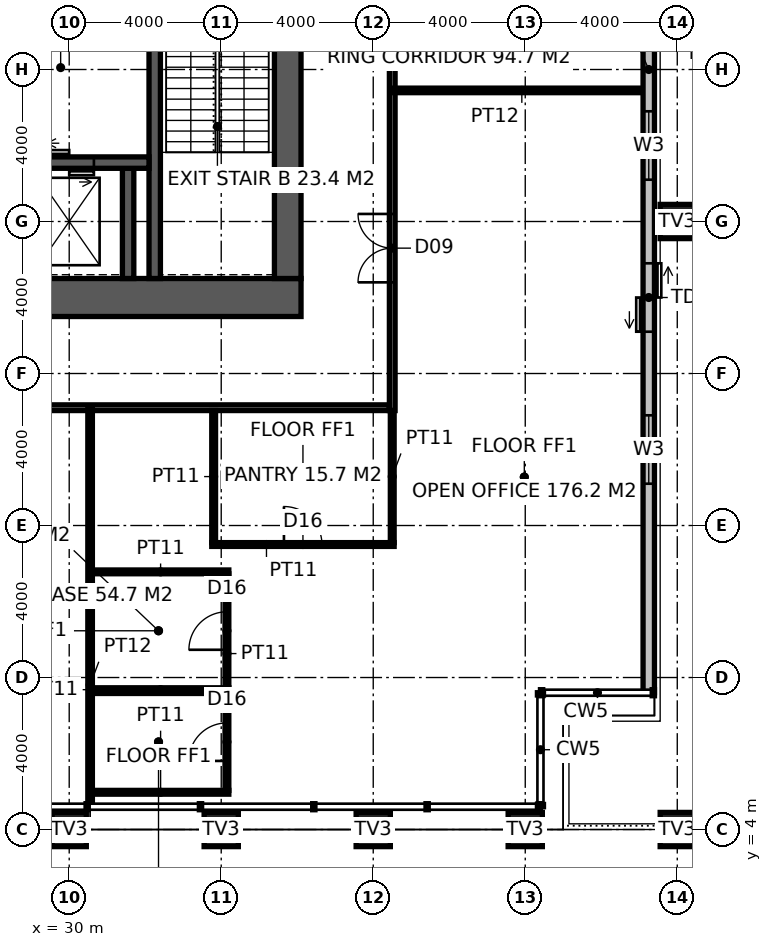
"""IFC4 building model, lengths in metres.
Left out: names, types, materials, properties, quantities, classifications, styles, units other than length and angle.
Written with IfcOpenShell. Run it as: python <this file> out.ifc"""

import sys

from ifc_helpers import new_model, si_unit, direction, frame, frame_2d, origin, origin_2d, place, context, subcontext, project, spatial, rectangle, hollow_rectangle, extrude, element, fill, save


model = new_model("IFC4")
c1 = context("Model", 3, precision=1e-05, world=origin(), true_north=direction((0.0, 1.0)))
c2 = subcontext(c1, "Body", "Model", "MODEL_VIEW")
j1 = project(units=[si_unit("LENGTHUNIT", "METRE"), si_unit("PLANEANGLEUNIT", "RADIAN")], contexts=[c1])
p1 = place(None, origin())
s1 = spatial("IfcSite", under=j1, at=p1, CompositionType="ELEMENT")
p2 = place(p1, origin())
s2 = spatial("IfcBuilding", under=s1, at=p2, CompositionType="ELEMENT")
p3 = place(p2, frame((0.0, 0.0, 270.2)))
s3 = spatial("IfcBuildingStorey", under=s2, at=p3, CompositionType="ELEMENT", Elevation=270.2)
for number, where, z_axis, x_axis in (
    (1, (30.0, 4.0, 0.0), (0.0, 0.0, 1.0), (1.0, 0.0, 0.0)),
    (2, (34.0, 4.0, 0.0), (0.0, 0.0, 1.0), (1.0, 0.0, 0.0)),
    (3, (38.0, 4.0, 0.0), (0.0, 0.0, 1.0), (1.0, 0.0, 0.0)),
    (4, (42.0, 4.0, 0.0), (0.0, 0.0, 1.0), (1.0, 0.0, 0.0)),
    (5, (46.0, 4.0, 0.0), (0.0, 0.0, 1.0), (1.0, 0.0, 0.0)),
    (6, (46.0, 20.0, 0.0), (0.0, 0.0, 1.0), (1.0, 0.0, 0.0)),
):
    element("IfcColumn", number, at=place(p3, frame(where, z_axis=z_axis, x_axis=x_axis)), inside=s3, PredefinedType="USERDEFINED", context=c2, shape_type="SweptSolid", body=[
        extrude(hollow_rectangle(XDim=0.9, YDim=0.9, WallThickness=0.08, at=origin_2d()), origin(), (0.0, 0.0, 1.0), 4.0),
    ])
p4 = place(p3, frame((18.5, 18.0, -0.15), z_axis=(0.0, 0.0, 1.0), x_axis=(1.0, 0.0, 0.0)))
e7 = element("IfcWall", 7, at=p4, inside=s3, PredefinedType="SHEAR", context=c2, shape_type="SweptSolid", body=[
    extrude(rectangle(XDim=17.6, YDim=1.0, at=frame_2d((8.8, 0.0))), origin(), (0.0, 0.0, 1.0), 4.0),
])
p5 = place(p4, frame((3.45, 0.0, 0.15)))
e8 = element("IfcOpeningElement", 8, at=p5, cuts=e7, PredefinedType="OPENING", context=c2, shape_type="SweptSolid", body=[
    extrude(rectangle(XDim=1.5, YDim=2.4, at=frame_2d((0.75, 1.2))), frame((0.0, 0.51, 0.0), z_axis=(0.0, -1.0, 0.0), x_axis=(1.0, 0.0, 0.0)), (0.0, 0.0, 1.0), 1.02),
])
p6 = place(p3, frame((35.75, 18.5, -0.15), z_axis=(0.0, 0.0, 1.0), x_axis=(0.0, 1.0, 0.0)))
e9 = element("IfcWall", 9, at=p6, inside=s3, PredefinedType="SHEAR", context=c2, shape_type="SweptSolid", body=[
    extrude(rectangle(XDim=17.0, YDim=0.7, at=frame_2d((8.5, 0.0))), origin(), (0.0, 0.0, 1.0), 4.0),
])
p7 = place(p6, frame((9.85, 0.0, 0.15)))
e10 = element("IfcOpeningElement", 10, at=p7, cuts=e9, PredefinedType="OPENING", context=c2, shape_type="SweptSolid", body=[
    extrude(rectangle(XDim=1.0, YDim=2.2, at=frame_2d((0.5, 1.1))), frame((0.0, 0.36, 0.0), z_axis=(0.0, -1.0, 0.0), x_axis=(1.0, 0.0, 0.0)), (0.0, 0.0, 1.0), 0.72),
])
p8 = place(p3, frame((32.25, 18.5, -0.15), z_axis=(0.0, 0.0, 1.0), x_axis=(0.0, 1.0, 0.0)))
e11 = element("IfcWall", 11, at=p8, inside=s3, PredefinedType="SHEAR", context=c2, shape_type="SweptSolid", body=[
    extrude(rectangle(XDim=7.9, YDim=0.3, at=frame_2d((3.95, 0.0))), origin(), (0.0, 0.0, 1.0), 4.0),
])
p9 = place(p3, frame((31.55, 18.5, -0.15), z_axis=(0.0, 0.0, 1.0), x_axis=(0.0, 1.0, 0.0)))
e12 = element("IfcWall", 12, at=p9, inside=s3, PredefinedType="SHEAR", context=c2, shape_type="SweptSolid", body=[
    extrude(rectangle(XDim=2.9, YDim=0.3, at=frame_2d((1.45, 0.0))), origin(), (0.0, 0.0, 1.0), 4.0),
])
p10 = place(p3, frame((28.3, 21.55, -0.15), z_axis=(0.0, 0.0, 1.0), x_axis=(1.0, 0.0, 0.0)))
e13 = element("IfcWall", 13, at=p10, inside=s3, PredefinedType="SHEAR", context=c2, shape_type="SweptSolid", body=[
    extrude(rectangle(XDim=3.8, YDim=0.3, at=frame_2d((1.9, 0.0))), origin(), (0.0, 0.0, 1.0), 4.0),
])
p11 = place(p10, frame((1.05, 0.0, 0.15)))
e14 = element("IfcOpeningElement", 14, at=p11, cuts=e13, PredefinedType="OPENING", context=c2, shape_type="SweptSolid", body=[
    extrude(rectangle(XDim=1.3, YDim=2.4, at=frame_2d((0.65, 1.2))), frame((0.0, 0.16, 0.0), z_axis=(0.0, -1.0, 0.0), x_axis=(1.0, 0.0, 0.0)), (0.0, 0.0, 1.0), 0.32),
])
p12 = place(p3, frame((38.5, 15.025, 0.0), z_axis=(0.0, 0.0, 1.0), x_axis=(0.0, 1.0, 0.0)))
e15 = element("IfcWall", 15, at=p12, inside=s3, PredefinedType="PARTITIONING", context=c2, shape_type="SweptSolid", body=[
    extrude(rectangle(XDim=23.35, YDim=0.15, at=frame_2d((11.675, 0.0))), origin(), (0.0, 0.0, 1.0), 2.85),
])
p13 = place(p12, frame((3.374, 0.0, 0.0)))
e16 = element("IfcOpeningElement", 16, at=p13, cuts=e15, PredefinedType="OPENING", context=c2, shape_type="SweptSolid", body=[
    extrude(rectangle(XDim=1.8, YDim=2.4, at=frame_2d((0.9, 1.2))), frame((0.0, 0.085, 0.0), z_axis=(0.0, -1.0, 0.0), x_axis=(1.0, 0.0, 0.0)), (0.0, 0.0, 1.0), 0.17),
])
p14 = place(p12, frame((17.476, 0.0, 0.0)))
e17 = element("IfcOpeningElement", 17, at=p14, cuts=e15, PredefinedType="OPENING", context=c2, shape_type="SweptSolid", body=[
    extrude(rectangle(XDim=1.8, YDim=2.4, at=frame_2d((0.9, 1.2))), frame((0.0, 0.085, 0.0), z_axis=(0.0, -1.0, 0.0), x_axis=(1.0, 0.0, 0.0)), (0.0, 0.0, 1.0), 0.17),
])
p15 = place(p12, frame((10.475, 0.0, 0.0)))
e18 = element("IfcOpeningElement", 18, at=p15, cuts=e15, PredefinedType="OPENING", context=c2, shape_type="SweptSolid", body=[
    extrude(rectangle(XDim=1.0, YDim=2.2, at=frame_2d((0.5, 1.1))), frame((0.0, 0.085, 0.0), z_axis=(0.0, -1.0, 0.0), x_axis=(1.0, 0.0, 0.0)), (0.0, 0.0, 1.0), 0.17),
])
p16 = place(p3, frame((15.775, 15.1, 0.0), z_axis=(0.0, 0.0, 1.0), x_axis=(1.0, 0.0, 0.0)))
e19 = element("IfcWall", 19, at=p16, inside=s3, PredefinedType="PARTITIONING", context=c2, shape_type="SweptSolid", body=[
    extrude(rectangle(XDim=22.65, YDim=0.15, at=frame_2d((11.325, 0.0))), origin(), (0.0, 0.0, 1.0), 3.85),
])
p17 = place(p16, frame((11.725, 0.0, 0.0)))
e20 = element("IfcOpeningElement", 20, at=p17, cuts=e19, PredefinedType="OPENING", context=c2, shape_type="SweptSolid", body=[
    extrude(rectangle(XDim=1.0, YDim=2.2, at=frame_2d((0.5, 1.1))), frame((0.0, 0.085, 0.0), z_axis=(0.0, -1.0, 0.0), x_axis=(1.0, 0.0, 0.0)), (0.0, 0.0, 1.0), 0.17),
])
p18 = place(p3, frame((30.55, 4.68, 0.0), z_axis=(0.0, 0.0, 1.0), x_axis=(0.0, 1.0, 0.0)))
e21 = element("IfcWall", 21, at=p18, inside=s3, PredefinedType="PARTITIONING", context=c2, shape_type="SweptSolid", body=[
    extrude(rectangle(XDim=10.42, YDim=0.12, at=frame_2d((5.21, 0.0))), origin(), (0.0, 0.0, 1.0), 2.65),
])
p19 = place(p3, frame((38.5, 23.45, 0.0), z_axis=(0.0, 0.0, 1.0), x_axis=(1.0, 0.0, 0.0)))
e22 = element("IfcWall", 22, at=p19, inside=s3, PredefinedType="PARTITIONING", context=c2, shape_type="SweptSolid", body=[
    extrude(rectangle(XDim=6.82, YDim=0.12, at=frame_2d((3.41, 0.0))), origin(), (0.0, 0.0, 1.0), 2.65),
])
for number, where, z_axis, x_axis in (
    (23, (30.61, 4.98, 0.0), (0.0, 0.0, 1.0), (1.0, 0.0, 0.0)),
    (24, (30.61, 7.63, 0.0), (0.0, 0.0, 1.0), (1.0, 0.0, 0.0)),
    (25, (30.61, 7.68, 0.0), (0.0, 0.0, 1.0), (1.0, 0.0, 0.0)),
    (26, (30.61, 10.78, 0.0), (0.0, 0.0, 1.0), (1.0, 0.0, 0.0)),
):
    element("IfcWall", number, at=place(p3, frame(where, z_axis=z_axis, x_axis=x_axis)), inside=s3, PredefinedType="PARTITIONING", context=c2, shape_type="SweptSolid", body=[
        extrude(rectangle(XDim=3.59, YDim=0.1, at=frame_2d((1.795, 0.0))), origin(), (0.0, 0.0, 1.0), 3.85),
    ])
p20 = place(p3, frame((33.751, 11.5, 0.0), z_axis=(0.0, 0.0, 1.0), x_axis=(1.0, 0.0, 0.0)))
e27 = element("IfcWall", 27, at=p20, inside=s3, PredefinedType="PARTITIONING", context=c2, shape_type="SweptSolid", body=[
    extrude(rectangle(XDim=4.799, YDim=0.1, at=frame_2d((2.399, 0.0))), origin(), (0.0, 0.0, 1.0), 3.85),
])
p21 = place(p20, frame((1.899, 0.0, 0.0)))
e28 = element("IfcOpeningElement", 28, at=p21, cuts=e27, PredefinedType="OPENING", context=c2, shape_type="SweptSolid", body=[
    extrude(rectangle(XDim=1.0, YDim=2.2, at=frame_2d((0.5, 1.1))), frame((0.0, 0.06, 0.0), z_axis=(0.0, -1.0, 0.0), x_axis=(1.0, 0.0, 0.0)), (0.0, 0.0, 1.0), 0.12),
])
p22 = place(p3, frame((33.801, 11.55, 0.0), z_axis=(0.0, 0.0, 1.0), x_axis=(0.0, 1.0, 0.0)))
e29 = element("IfcWall", 29, at=p22, inside=s3, PredefinedType="PARTITIONING", context=c2, shape_type="SweptSolid", body=[
    extrude(rectangle(XDim=3.475, YDim=0.1, at=frame_2d((1.737, 0.0))), origin(), (0.0, 0.0, 1.0), 3.85),
])
p23 = place(p3, frame((34.15, 5.03, 0.0), z_axis=(0.0, 0.0, 1.0), x_axis=(0.0, 1.0, 0.0)))
e30 = element("IfcWall", 30, at=p23, inside=s3, PredefinedType="PARTITIONING", context=c2, shape_type="SweptSolid", body=[
    extrude(rectangle(XDim=2.55, YDim=0.1, at=frame_2d((1.275, 0.0))), origin(), (0.0, 0.0, 1.0), 2.95),
])
p24 = place(p23, frame((0.775, 0.0, 0.0)))
e31 = element("IfcOpeningElement", 31, at=p24, cuts=e30, PredefinedType="OPENING", context=c2, shape_type="SweptSolid", body=[
    extrude(rectangle(XDim=1.0, YDim=2.2, at=frame_2d((0.5, 1.1))), frame((0.0, 0.06, 0.0), z_axis=(0.0, -1.0, 0.0), x_axis=(1.0, 0.0, 0.0)), (0.0, 0.0, 1.0), 0.12),
])
p25 = place(p3, frame((34.15, 7.73, 0.0), z_axis=(0.0, 0.0, 1.0), x_axis=(0.0, 1.0, 0.0)))
e32 = element("IfcWall", 32, at=p25, inside=s3, PredefinedType="PARTITIONING", context=c2, shape_type="SweptSolid", body=[
    extrude(rectangle(XDim=3.0, YDim=0.1, at=frame_2d((1.5, 0.0))), origin(), (0.0, 0.0, 1.0), 2.95),
])
p26 = place(p25, frame((1.0, 0.0, 0.0)))
e33 = element("IfcOpeningElement", 33, at=p26, cuts=e32, PredefinedType="OPENING", context=c2, shape_type="SweptSolid", body=[
    extrude(rectangle(XDim=1.0, YDim=2.2, at=frame_2d((0.5, 1.1))), frame((0.0, 0.06, 0.0), z_axis=(0.0, -1.0, 0.0), x_axis=(1.0, 0.0, 0.0)), (0.0, 0.0, 1.0), 0.12),
])
p27 = place(p3, frame((38.5, 11.55, 0.0), z_axis=(0.0, 0.0, 1.0), x_axis=(0.0, 1.0, 0.0)))
e34 = element("IfcWall", 34, at=p27, inside=s3, PredefinedType="PARTITIONING", context=c2, shape_type="SweptSolid", body=[
    extrude(rectangle(XDim=3.475, YDim=0.1, at=frame_2d((1.737, 0.0))), origin(), (0.0, 0.0, 1.0), 3.85),
])
p28 = place(p3, frame((45.25, 7.6, 0.0), z_axis=(0.0, 0.0, 1.0), x_axis=(0.0, 1.0, 0.0)))
e35 = element("IfcWall", 35, at=p28, inside=s3, PredefinedType="ELEMENTEDWALL", context=c2, shape_type="SweptSolid", body=[
    extrude(rectangle(XDim=32.8, YDim=0.3, at=frame_2d((16.4, 0.0))), origin(), (0.0, 0.0, 1.0), 3.85),
])
p29 = place(p28, frame((5.5, 0.0, 0.8)))
e36 = element("IfcOpeningElement", 36, at=p29, cuts=e35, PredefinedType="OPENING", context=c2, shape_type="SweptSolid", body=[
    extrude(rectangle(XDim=1.8, YDim=2.4, at=frame_2d((0.9, 1.2))), frame((0.0, 0.16, 0.0), z_axis=(0.0, -1.0, 0.0), x_axis=(1.0, 0.0, 0.0)), (0.0, 0.0, 1.0), 0.32),
])
p30 = place(p28, frame((9.5, 0.0, 0.0)))
e37 = element("IfcOpeningElement", 37, at=p30, cuts=e35, PredefinedType="OPENING", context=c2, shape_type="SweptSolid", body=[
    extrude(rectangle(XDim=1.8, YDim=2.4, at=frame_2d((0.9, 1.2))), frame((0.0, 0.16, 0.0), z_axis=(0.0, -1.0, 0.0), x_axis=(1.0, 0.0, 0.0)), (0.0, 0.0, 1.0), 0.32),
])
p31 = place(p28, frame((13.5, 0.0, 0.8)))
e38 = element("IfcOpeningElement", 38, at=p31, cuts=e35, PredefinedType="OPENING", context=c2, shape_type="SweptSolid", body=[
    extrude(rectangle(XDim=1.8, YDim=2.4, at=frame_2d((0.9, 1.2))), frame((0.0, 0.16, 0.0), z_axis=(0.0, -1.0, 0.0), x_axis=(1.0, 0.0, 0.0)), (0.0, 0.0, 1.0), 0.32),
])
p32 = place(p28, frame((17.5, 0.0, 0.8)))
e39 = element("IfcOpeningElement", 39, at=p32, cuts=e35, PredefinedType="OPENING", context=c2, shape_type="SweptSolid", body=[
    extrude(rectangle(XDim=1.8, YDim=2.4, at=frame_2d((0.9, 1.2))), frame((0.0, 0.16, 0.0), z_axis=(0.0, -1.0, 0.0), x_axis=(1.0, 0.0, 0.0)), (0.0, 0.0, 1.0), 0.32),
])
p33 = place(p28, frame((21.5, 0.0, 0.8)))
e40 = element("IfcOpeningElement", 40, at=p33, cuts=e35, PredefinedType="OPENING", context=c2, shape_type="SweptSolid", body=[
    extrude(rectangle(XDim=1.8, YDim=2.4, at=frame_2d((0.9, 1.2))), frame((0.0, 0.16, 0.0), z_axis=(0.0, -1.0, 0.0), x_axis=(1.0, 0.0, 0.0)), (0.0, 0.0, 1.0), 0.32),
])
p34 = place(p28, frame((25.5, 0.0, 0.8)))
e41 = element("IfcOpeningElement", 41, at=p34, cuts=e35, PredefinedType="OPENING", context=c2, shape_type="SweptSolid", body=[
    extrude(rectangle(XDim=1.8, YDim=2.4, at=frame_2d((0.9, 1.2))), frame((0.0, 0.16, 0.0), z_axis=(0.0, -1.0, 0.0), x_axis=(1.0, 0.0, 0.0)), (0.0, 0.0, 1.0), 0.32),
])
p35 = place(p13, origin())
e42 = element("IfcDoor", 42, at=p35, inside=s3, OperationType="DOUBLE_DOOR_DOUBLE_SWING", PredefinedType="DOOR", context=c2, shape_type="SweptSolid", body=[
    extrude(rectangle(XDim=1.8, YDim=2.4, at=frame_2d((0.9, 1.2))), frame((0.0, 0.025, 0.0), z_axis=(0.0, -1.0, 0.0), x_axis=(1.0, 0.0, 0.0)), (0.0, 0.0, 1.0), 0.05),
])
fill(e16, e42)
p36 = place(p21, origin())
e43 = element("IfcDoor", 43, at=p36, inside=s3, OperationType="SINGLE_SWING_LEFT", PredefinedType="DOOR", context=c2, shape_type="SweptSolid", body=[
    extrude(rectangle(XDim=1.0, YDim=2.2, at=frame_2d((0.5, 1.1))), frame((0.0, 0.025, 0.0), z_axis=(0.0, -1.0, 0.0), x_axis=(1.0, 0.0, 0.0)), (0.0, 0.0, 1.0), 0.05),
])
fill(e28, e43)
p37 = place(p24, origin())
e44 = element("IfcDoor", 44, at=p37, inside=s3, OperationType="SINGLE_SWING_LEFT", PredefinedType="DOOR", context=c2, shape_type="SweptSolid", body=[
    extrude(rectangle(XDim=1.0, YDim=2.2, at=frame_2d((0.5, 1.1))), frame((0.0, 0.025, 0.0), z_axis=(0.0, -1.0, 0.0), x_axis=(1.0, 0.0, 0.0)), (0.0, 0.0, 1.0), 0.05),
])
fill(e31, e44)
p38 = place(p26, origin())
e45 = element("IfcDoor", 45, at=p38, inside=s3, OperationType="SINGLE_SWING_LEFT", PredefinedType="DOOR", context=c2, shape_type="SweptSolid", body=[
    extrude(rectangle(XDim=1.0, YDim=2.2, at=frame_2d((0.5, 1.1))), frame((0.0, 0.025, 0.0), z_axis=(0.0, -1.0, 0.0), x_axis=(1.0, 0.0, 0.0)), (0.0, 0.0, 1.0), 0.05),
])
fill(e33, e45)
p39 = place(p11, origin())
e46 = element("IfcDoor", 46, at=p39, inside=s3, OperationType="DOUBLE_DOOR_SLIDING", PredefinedType="DOOR", context=c2, shape_type="SweptSolid", body=[
    extrude(rectangle(XDim=1.3, YDim=2.4, at=frame_2d((0.65, 1.2))), frame((0.0, 0.025, 0.0), z_axis=(0.0, -1.0, 0.0), x_axis=(1.0, 0.0, 0.0)), (0.0, 0.0, 1.0), 0.05),
])
fill(e14, e46)
p40 = place(p29, origin())
e47 = element("IfcWindow", 47, at=p40, inside=s3, PartitioningType="SINGLE_PANEL", PredefinedType="WINDOW", context=c2, shape_type="SweptSolid", body=[
    extrude(rectangle(XDim=1.8, YDim=2.4, at=frame_2d((0.9, 1.2))), frame((0.0, 0.03, 0.0), z_axis=(0.0, -1.0, 0.0), x_axis=(1.0, 0.0, 0.0)), (0.0, 0.0, 1.0), 0.06),
])
fill(e36, e47)
p41 = place(p30, origin())
e48 = element("IfcDoor", 48, at=p41, inside=s3, OperationType="DOUBLE_DOOR_SLIDING", PredefinedType="DOOR", context=c2, shape_type="SweptSolid", body=[
    extrude(rectangle(XDim=1.8, YDim=2.4, at=frame_2d((0.9, 1.2))), frame((0.0, 0.025, 0.0), z_axis=(0.0, -1.0, 0.0), x_axis=(1.0, 0.0, 0.0)), (0.0, 0.0, 1.0), 0.05),
])
fill(e37, e48)
p42 = place(p31, origin())
e49 = element("IfcWindow", 49, at=p42, inside=s3, PartitioningType="SINGLE_PANEL", PredefinedType="WINDOW", context=c2, shape_type="SweptSolid", body=[
    extrude(rectangle(XDim=1.8, YDim=2.4, at=frame_2d((0.9, 1.2))), frame((0.0, 0.03, 0.0), z_axis=(0.0, -1.0, 0.0), x_axis=(1.0, 0.0, 0.0)), (0.0, 0.0, 1.0), 0.06),
])
fill(e38, e49)
save(model, sys.argv[1])
